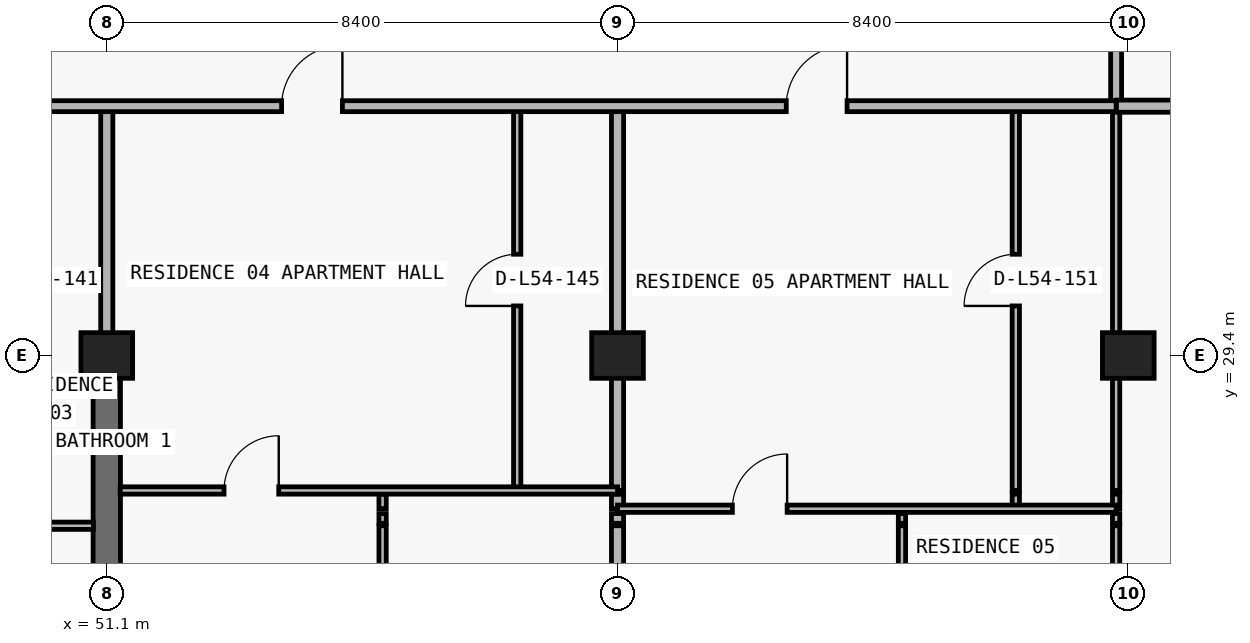
"""IFC4 building model, lengths in metres.
Left out: names, types, materials, properties, quantities, classifications, styles, units other than length and angle.
Written with IfcOpenShell. Run it as: python <this file> out.ifc"""

import sys

from ifc_helpers import new_model, si_unit, direction, frame, frame_2d, origin, origin_2d, place, context, subcontext, project, spatial, rectangle, extrude, element, fill, save


model = new_model("IFC4")
c1 = context("Model", 3, precision=1e-05, world=origin(), true_north=direction((0.0, 1.0)))
c2 = subcontext(c1, "Body", "Model", "MODEL_VIEW")
j1 = project(units=[si_unit("LENGTHUNIT", "METRE"), si_unit("PLANEANGLEUNIT", "RADIAN")], contexts=[c1])
p1 = place(None, origin())
s1 = spatial("IfcSite", under=j1, at=p1, CompositionType="ELEMENT")
p2 = place(p1, origin())
s2 = spatial("IfcBuilding", under=s1, at=p2, CompositionType="ELEMENT")
p3 = place(p2, frame((0.0, 0.0, 195.0)))
s3 = spatial("IfcBuildingStorey", under=s2, at=p3, CompositionType="ELEMENT", Elevation=195.0)
for number, where, z_axis, x_axis in (
    (1, (51.1, 29.4, 0.0), (0.0, 0.0, 1.0), (1.0, 0.0, 0.0)),
    (2, (59.5, 29.4, 0.0), (0.0, 0.0, 1.0), (1.0, 0.0, 0.0)),
    (3, (67.9, 29.4, 0.0), (0.0, 0.0, 1.0), (1.0, 0.0, 0.0)),
):
    element("IfcColumn", number, at=place(p3, frame(where, z_axis=z_axis, x_axis=x_axis)), inside=s3, PredefinedType="COLUMN", context=c2, shape_type="SweptSolid", body=[
        extrude(rectangle(XDim=0.85, YDim=0.75, at=origin_2d()), origin(), (0.0, 0.0, 1.0), 3.05),
    ])
p4 = place(p3, frame((51.1, 20.8, 0.0), z_axis=(0.0, 0.0, 1.0), x_axis=(0.0, 1.0, 0.0)))
e4 = element("IfcWall", 4, at=p4, inside=s3, PredefinedType="SHEAR", context=c2, shape_type="SweptSolid", body=[
    extrude(rectangle(XDim=8.6, YDim=0.45, at=frame_2d((4.3, 0.0))), origin(), (0.0, 0.0, 1.0), 3.05),
])
p5 = place(p3, frame((51.1, 29.405, 0.0), z_axis=(0.0, 0.0, 1.0), x_axis=(0.0, 1.0, 0.0)))
e5 = element("IfcWall", 5, at=p5, inside=s3, PredefinedType="PARTITIONING", context=c2, shape_type="SweptSolid", body=[
    extrude(rectangle(XDim=4.095, YDim=0.2, at=frame_2d((2.047, 0.0))), origin(), (0.0, 0.0, 1.0), 2.335),
])
p6 = place(p3, frame((55.636, 22.24, 0.0), z_axis=(0.0, 0.0, 1.0), x_axis=(0.0, 1.0, 0.0)))
e6 = element("IfcWall", 6, at=p6, inside=s3, PredefinedType="PARTITIONING", context=c2, shape_type="SweptSolid", body=[
    extrude(rectangle(XDim=4.36, YDim=0.12, at=frame_2d((2.18, 0.0))), origin(), (0.0, 0.0, 1.0), 3.05),
])
p7 = place(p6, frame((1.73, 0.0, 0.0)))
e7 = element("IfcOpeningElement", 7, at=p7, cuts=e6, PredefinedType="OPENING", context=c2, shape_type="SweptSolid", body=[
    extrude(rectangle(XDim=0.9, YDim=2.15, at=frame_2d((0.45, 1.075))), frame((0.0, 0.07, 0.0), z_axis=(0.0, -1.0, 0.0), x_axis=(1.0, 0.0, 0.0)), (0.0, 0.0, 1.0), 0.14),
])
p8 = place(p3, frame((55.636, 26.64, 0.0), z_axis=(0.0, 0.0, 1.0), x_axis=(0.0, 1.0, 0.0)))
e8 = element("IfcWall", 8, at=p8, inside=s3, PredefinedType="PARTITIONING", context=c2, shape_type="SweptSolid", body=[
    extrude(rectangle(XDim=0.16, YDim=0.12, at=frame_2d((0.08, 0.0))), origin(), (0.0, 0.0, 1.0), 3.05),
])
p9 = place(p3, frame((55.636, 26.88, 0.0), z_axis=(0.0, 0.0, 1.0), x_axis=(0.0, 1.0, 0.0)))
e9 = element("IfcWall", 9, at=p9, inside=s3, PredefinedType="PARTITIONING", context=c2, shape_type="SweptSolid", body=[
    extrude(rectangle(XDim=0.24, YDim=0.12, at=frame_2d((0.12, 0.0))), origin(), (0.0, 0.0, 1.0), 3.05),
])
p10 = place(p3, frame((57.85, 27.18, 0.0), z_axis=(0.0, 0.0, 1.0), x_axis=(0.0, 1.0, 0.0)))
e10 = element("IfcWall", 10, at=p10, inside=s3, PredefinedType="PARTITIONING", context=c2, shape_type="SweptSolid", body=[
    extrude(rectangle(XDim=6.32, YDim=0.12, at=frame_2d((3.16, 0.0))), origin(), (0.0, 0.0, 1.0), 3.05),
])
p11 = place(p10, frame((3.035, 0.0, 0.0)))
e11 = element("IfcOpeningElement", 11, at=p11, cuts=e10, PredefinedType="OPENING", context=c2, shape_type="SweptSolid", body=[
    extrude(rectangle(XDim=0.85, YDim=2.1, at=frame_2d((0.425, 1.05))), frame((0.0, 0.07, 0.0), z_axis=(0.0, -1.0, 0.0), x_axis=(1.0, 0.0, 0.0)), (0.0, 0.0, 1.0), 0.14),
])
p12 = place(p3, frame((59.5, 22.24, 0.0), z_axis=(0.0, 0.0, 1.0), x_axis=(0.0, 1.0, 0.0)))
e12 = element("IfcWall", 12, at=p12, inside=s3, PredefinedType="PARTITIONING", context=c2, shape_type="SweptSolid", body=[
    extrude(rectangle(XDim=4.36, YDim=0.2, at=frame_2d((2.18, 0.0))), origin(), (0.0, 0.0, 1.0), 2.263),
])
p13 = place(p3, frame((59.5, 26.64, 0.0), z_axis=(0.0, 0.0, 1.0), x_axis=(0.0, 1.0, 0.0)))
e13 = element("IfcWall", 13, at=p13, inside=s3, PredefinedType="PARTITIONING", context=c2, shape_type="SweptSolid", body=[
    extrude(rectangle(XDim=0.16, YDim=0.2, at=frame_2d((0.08, 0.0))), origin(), (0.0, 0.0, 1.0), 2.263),
])
p14 = place(p3, frame((59.5, 26.88, 0.0), z_axis=(0.0, 0.0, 1.0), x_axis=(0.0, 1.0, 0.0)))
e14 = element("IfcWall", 14, at=p14, inside=s3, PredefinedType="PARTITIONING", context=c2, shape_type="SweptSolid", body=[
    extrude(rectangle(XDim=0.24, YDim=0.2, at=frame_2d((0.12, 0.0))), origin(), (0.0, 0.0, 1.0), 2.263),
])
p15 = place(p3, frame((59.5, 27.18, 0.0), z_axis=(0.0, 0.0, 1.0), x_axis=(0.0, 1.0, 0.0)))
e15 = element("IfcWall", 15, at=p15, inside=s3, PredefinedType="PARTITIONING", context=c2, shape_type="SweptSolid", body=[
    extrude(rectangle(XDim=6.32, YDim=0.2, at=frame_2d((3.16, 0.0))), origin(), (0.0, 0.0, 1.0), 2.263),
])
p16 = place(p3, frame((64.178, 22.24, 0.0), z_axis=(0.0, 0.0, 1.0), x_axis=(0.0, 1.0, 0.0)))
e16 = element("IfcWall", 16, at=p16, inside=s3, PredefinedType="PARTITIONING", context=c2, shape_type="SweptSolid", body=[
    extrude(rectangle(XDim=4.36, YDim=0.12, at=frame_2d((2.18, 0.0))), origin(), (0.0, 0.0, 1.0), 3.05),
])
p17 = place(p16, frame((1.73, 0.0, 0.0)))
e17 = element("IfcOpeningElement", 17, at=p17, cuts=e16, PredefinedType="OPENING", context=c2, shape_type="SweptSolid", body=[
    extrude(rectangle(XDim=0.9, YDim=2.15, at=frame_2d((0.45, 1.075))), frame((0.0, 0.07, 0.0), z_axis=(0.0, -1.0, 0.0), x_axis=(1.0, 0.0, 0.0)), (0.0, 0.0, 1.0), 0.14),
])
p18 = place(p3, frame((64.178, 26.64, 0.0), z_axis=(0.0, 0.0, 1.0), x_axis=(0.0, 1.0, 0.0)))
e18 = element("IfcWall", 18, at=p18, inside=s3, PredefinedType="PARTITIONING", context=c2, shape_type="SweptSolid", body=[
    extrude(rectangle(XDim=0.16, YDim=0.12, at=frame_2d((0.08, 0.0))), origin(), (0.0, 0.0, 1.0), 3.05),
])
p19 = place(p3, frame((66.05, 26.88, 0.0), z_axis=(0.0, 0.0, 1.0), x_axis=(0.0, 1.0, 0.0)))
e19 = element("IfcWall", 19, at=p19, inside=s3, PredefinedType="PARTITIONING", context=c2, shape_type="SweptSolid", body=[
    extrude(rectangle(XDim=0.24, YDim=0.12, at=frame_2d((0.12, 0.0))), origin(), (0.0, 0.0, 1.0), 3.05),
])
p20 = place(p3, frame((66.05, 27.18, 0.0), z_axis=(0.0, 0.0, 1.0), x_axis=(0.0, 1.0, 0.0)))
e20 = element("IfcWall", 20, at=p20, inside=s3, PredefinedType="PARTITIONING", context=c2, shape_type="SweptSolid", body=[
    extrude(rectangle(XDim=6.32, YDim=0.12, at=frame_2d((3.16, 0.0))), origin(), (0.0, 0.0, 1.0), 3.05),
])
p21 = place(p20, frame((3.035, 0.0, 0.0)))
e21 = element("IfcOpeningElement", 21, at=p21, cuts=e20, PredefinedType="OPENING", context=c2, shape_type="SweptSolid", body=[
    extrude(rectangle(XDim=0.85, YDim=2.1, at=frame_2d((0.425, 1.05))), frame((0.0, 0.07, 0.0), z_axis=(0.0, -1.0, 0.0), x_axis=(1.0, 0.0, 0.0)), (0.0, 0.0, 1.0), 0.14),
])
p22 = place(p3, frame((67.7, 22.24, 0.0), z_axis=(0.0, 0.0, 1.0), x_axis=(0.0, 1.0, 0.0)))
e22 = element("IfcWall", 22, at=p22, inside=s3, PredefinedType="PARTITIONING", context=c2, shape_type="SweptSolid", body=[
    extrude(rectangle(XDim=4.36, YDim=0.12, at=frame_2d((2.18, 0.0))), origin(), (0.0, 0.0, 1.0), 2.263),
])
p23 = place(p22, frame((1.73, 0.0, 0.0)))
e23 = element("IfcOpeningElement", 23, at=p23, cuts=e22, PredefinedType="OPENING", context=c2, shape_type="SweptSolid", body=[
    extrude(rectangle(XDim=0.9, YDim=2.15, at=frame_2d((0.45, 1.075))), frame((0.0, 0.07, 0.0), z_axis=(0.0, -1.0, 0.0), x_axis=(1.0, 0.0, 0.0)), (0.0, 0.0, 1.0), 0.14),
])
p24 = place(p3, frame((67.7, 26.64, 0.0), z_axis=(0.0, 0.0, 1.0), x_axis=(0.0, 1.0, 0.0)))
e24 = element("IfcWall", 24, at=p24, inside=s3, PredefinedType="PARTITIONING", context=c2, shape_type="SweptSolid", body=[
    extrude(rectangle(XDim=0.16, YDim=0.12, at=frame_2d((0.08, 0.0))), origin(), (0.0, 0.0, 1.0), 2.263),
])
p25 = place(p3, frame((67.7, 26.88, 0.0), z_axis=(0.0, 0.0, 1.0), x_axis=(0.0, 1.0, 0.0)))
e25 = element("IfcWall", 25, at=p25, inside=s3, PredefinedType="PARTITIONING", context=c2, shape_type="SweptSolid", body=[
    extrude(rectangle(XDim=0.24, YDim=0.12, at=frame_2d((0.12, 0.0))), origin(), (0.0, 0.0, 1.0), 2.263),
])
p26 = place(p3, frame((67.7, 27.18, 0.0), z_axis=(0.0, 0.0, 1.0), x_axis=(0.0, 1.0, 0.0)))
e26 = element("IfcWall", 26, at=p26, inside=s3, PredefinedType="PARTITIONING", context=c2, shape_type="SweptSolid", body=[
    extrude(rectangle(XDim=6.32, YDim=0.12, at=frame_2d((3.16, 0.0))), origin(), (0.0, 0.0, 1.0), 2.263),
])
p27 = place(p3, frame((67.7, 33.505, 0.0), z_axis=(0.0, 0.0, 1.0), x_axis=(0.0, 1.0, 0.0)))
e27 = element("IfcWall", 27, at=p27, inside=s3, PredefinedType="PARTITIONING", context=c2, shape_type="SweptSolid", body=[
    extrude(rectangle(XDim=3.495, YDim=0.18, at=frame_2d((1.748, 0.0))), origin(), (0.0, 0.0, 1.0), 2.263),
])
p28 = place(p3, frame((42.7, 26.6, 0.0), z_axis=(0.0, 0.0, 1.0), x_axis=(1.0, 0.0, 0.0)))
e28 = element("IfcWall", 28, at=p28, inside=s3, PredefinedType="PARTITIONING", context=c2, shape_type="SweptSolid", body=[
    extrude(rectangle(XDim=8.18, YDim=0.12, at=frame_2d((4.09, 0.0))), origin(), (0.0, 0.0, 1.0), 3.05),
])
p29 = place(p28, frame((3.0, 0.0, 0.0)))
e29 = element("IfcOpeningElement", 29, at=p29, cuts=e28, PredefinedType="OPENING", context=c2, shape_type="SweptSolid", body=[
    extrude(rectangle(XDim=0.9, YDim=2.15, at=frame_2d((0.45, 1.075))), frame((0.0, 0.07, 0.0), z_axis=(0.0, -1.0, 0.0), x_axis=(1.0, 0.0, 0.0)), (0.0, 0.0, 1.0), 0.14),
])
p30 = place(p3, frame((59.5, 26.88, 0.0), z_axis=(0.0, 0.0, 1.0), x_axis=(1.0, 0.0, 0.0)))
e30 = element("IfcWall", 30, at=p30, inside=s3, PredefinedType="PARTITIONING", context=c2, shape_type="SweptSolid", body=[
    extrude(rectangle(XDim=8.2, YDim=0.12, at=frame_2d((4.1, 0.0))), origin(), (0.0, 0.0, 1.0), 3.05),
])
p31 = place(p30, frame((1.889, 0.0, 0.0)))
e31 = element("IfcOpeningElement", 31, at=p31, cuts=e30, PredefinedType="OPENING", context=c2, shape_type="SweptSolid", body=[
    extrude(rectangle(XDim=0.9, YDim=2.15, at=frame_2d((0.45, 1.075))), frame((0.0, 0.07, 0.0), z_axis=(0.0, -1.0, 0.0), x_axis=(1.0, 0.0, 0.0)), (0.0, 0.0, 1.0), 0.14),
])
p32 = place(p3, frame((51.32, 27.18, 0.0), z_axis=(0.0, 0.0, 1.0), x_axis=(1.0, 0.0, 0.0)))
e32 = element("IfcWall", 32, at=p32, inside=s3, PredefinedType="PARTITIONING", context=c2, shape_type="SweptSolid", body=[
    extrude(rectangle(XDim=8.18, YDim=0.12, at=frame_2d((4.09, 0.0))), origin(), (0.0, 0.0, 1.0), 3.05),
])
p33 = place(p32, frame((1.708, 0.0, 0.0)))
e33 = element("IfcOpeningElement", 33, at=p33, cuts=e32, PredefinedType="OPENING", context=c2, shape_type="SweptSolid", body=[
    extrude(rectangle(XDim=0.9, YDim=2.15, at=frame_2d((0.45, 1.075))), frame((0.0, 0.07, 0.0), z_axis=(0.0, -1.0, 0.0), x_axis=(1.0, 0.0, 0.0)), (0.0, 0.0, 1.0), 0.14),
])
p34 = place(p3, frame((10.105, 33.5, 0.0), z_axis=(0.0, 0.0, 1.0), x_axis=(1.0, 0.0, 0.0)))
e34 = element("IfcWall", 34, at=p34, inside=s3, PredefinedType="PARTITIONING", context=c2, shape_type="SweptSolid", body=[
    extrude(rectangle(XDim=57.595, YDim=0.18, at=frame_2d((28.797, 0.0))), origin(), (0.0, 0.0, 1.0), 3.05),
])
p35 = place(p34, frame((2.824, 0.0, 0.0)))
e35 = element("IfcOpeningElement", 35, at=p35, cuts=e34, PredefinedType="OPENING", context=c2, shape_type="SweptSolid", body=[
    extrude(rectangle(XDim=1.0, YDim=2.2, at=frame_2d((0.5, 1.1))), frame((0.0, 0.1, 0.0), z_axis=(0.0, -1.0, 0.0), x_axis=(1.0, 0.0, 0.0)), (0.0, 0.0, 1.0), 0.2),
])
p36 = place(p34, frame((19.47, 0.0, 0.0)))
e36 = element("IfcOpeningElement", 36, at=p36, cuts=e34, PredefinedType="OPENING", context=c2, shape_type="SweptSolid", body=[
    extrude(rectangle(XDim=1.0, YDim=2.2, at=frame_2d((0.5, 1.1))), frame((0.0, 0.1, 0.0), z_axis=(0.0, -1.0, 0.0), x_axis=(1.0, 0.0, 0.0)), (0.0, 0.0, 1.0), 0.2),
])
p37 = place(p34, frame((27.527, 0.0, 0.0)))
e37 = element("IfcOpeningElement", 37, at=p37, cuts=e34, PredefinedType="OPENING", context=c2, shape_type="SweptSolid", body=[
    extrude(rectangle(XDim=1.0, YDim=2.2, at=frame_2d((0.5, 1.1))), frame((0.0, 0.1, 0.0), z_axis=(0.0, -1.0, 0.0), x_axis=(1.0, 0.0, 0.0)), (0.0, 0.0, 1.0), 0.2),
])
p38 = place(p34, frame((43.87, 0.0, 0.0)))
e38 = element("IfcOpeningElement", 38, at=p38, cuts=e34, PredefinedType="OPENING", context=c2, shape_type="SweptSolid", body=[
    extrude(rectangle(XDim=1.0, YDim=2.2, at=frame_2d((0.5, 1.1))), frame((0.0, 0.1, 0.0), z_axis=(0.0, -1.0, 0.0), x_axis=(1.0, 0.0, 0.0)), (0.0, 0.0, 1.0), 0.2),
])
p39 = place(p34, frame((52.17, 0.0, 0.0)))
e39 = element("IfcOpeningElement", 39, at=p39, cuts=e34, PredefinedType="OPENING", context=c2, shape_type="SweptSolid", body=[
    extrude(rectangle(XDim=1.0, YDim=2.2, at=frame_2d((0.5, 1.1))), frame((0.0, 0.1, 0.0), z_axis=(0.0, -1.0, 0.0), x_axis=(1.0, 0.0, 0.0)), (0.0, 0.0, 1.0), 0.2),
])
p40 = place(p3, frame((67.705, 33.5, 0.0), z_axis=(0.0, 0.0, 1.0), x_axis=(1.0, 0.0, 0.0)))
e40 = element("IfcWall", 40, at=p40, inside=s3, PredefinedType="PARTITIONING", context=c2, shape_type="SweptSolid", body=[
    extrude(rectangle(XDim=3.7, YDim=0.2, at=frame_2d((1.85, 0.0))), origin(), (0.0, 0.0, 1.0), 3.05),
])
p41 = place(p38, origin())
e41 = element("IfcDoor", 41, at=p41, inside=s3, OperationType="SINGLE_SWING_RIGHT", PredefinedType="DOOR", context=c2, shape_type="SweptSolid", body=[
    extrude(rectangle(XDim=1.0, YDim=2.2, at=frame_2d((0.5, 1.1))), frame((0.0, 0.025, 0.0), z_axis=(0.0, -1.0, 0.0), x_axis=(1.0, 0.0, 0.0)), (0.0, 0.0, 1.0), 0.05),
])
fill(e38, e41)
p42 = place(p11, origin())
e42 = element("IfcDoor", 42, at=p42, inside=s3, OperationType="SINGLE_SWING_LEFT", PredefinedType="DOOR", context=c2, shape_type="SweptSolid", body=[
    extrude(rectangle(XDim=0.85, YDim=2.1, at=frame_2d((0.425, 1.05))), frame((0.0, 0.025, 0.0), z_axis=(0.0, -1.0, 0.0), x_axis=(1.0, 0.0, 0.0)), (0.0, 0.0, 1.0), 0.05),
])
fill(e11, e42)
p43 = place(p33, origin())
e43 = element("IfcDoor", 43, at=p43, inside=s3, OperationType="SINGLE_SWING_RIGHT", PredefinedType="DOOR", context=c2, shape_type="SweptSolid", body=[
    extrude(rectangle(XDim=0.9, YDim=2.15, at=frame_2d((0.45, 1.075))), frame((0.0, 0.025, 0.0), z_axis=(0.0, -1.0, 0.0), x_axis=(1.0, 0.0, 0.0)), (0.0, 0.0, 1.0), 0.05),
])
fill(e33, e43)
p44 = place(p39, origin())
e44 = element("IfcDoor", 44, at=p44, inside=s3, OperationType="SINGLE_SWING_RIGHT", PredefinedType="DOOR", context=c2, shape_type="SweptSolid", body=[
    extrude(rectangle(XDim=1.0, YDim=2.2, at=frame_2d((0.5, 1.1))), frame((0.0, 0.025, 0.0), z_axis=(0.0, -1.0, 0.0), x_axis=(1.0, 0.0, 0.0)), (0.0, 0.0, 1.0), 0.05),
])
fill(e39, e44)
p45 = place(p21, origin())
e45 = element("IfcDoor", 45, at=p45, inside=s3, OperationType="SINGLE_SWING_LEFT", PredefinedType="DOOR", context=c2, shape_type="SweptSolid", body=[
    extrude(rectangle(XDim=0.85, YDim=2.1, at=frame_2d((0.425, 1.05))), frame((0.0, 0.025, 0.0), z_axis=(0.0, -1.0, 0.0), x_axis=(1.0, 0.0, 0.0)), (0.0, 0.0, 1.0), 0.05),
])
fill(e21, e45)
p46 = place(p31, origin())
e46 = element("IfcDoor", 46, at=p46, inside=s3, OperationType="SINGLE_SWING_RIGHT", PredefinedType="DOOR", context=c2, shape_type="SweptSolid", body=[
    extrude(rectangle(XDim=0.9, YDim=2.15, at=frame_2d((0.45, 1.075))), frame((0.0, 0.025, 0.0), z_axis=(0.0, -1.0, 0.0), x_axis=(1.0, 0.0, 0.0)), (0.0, 0.0, 1.0), 0.05),
])
fill(e31, e46)
save(model, sys.argv[1])
